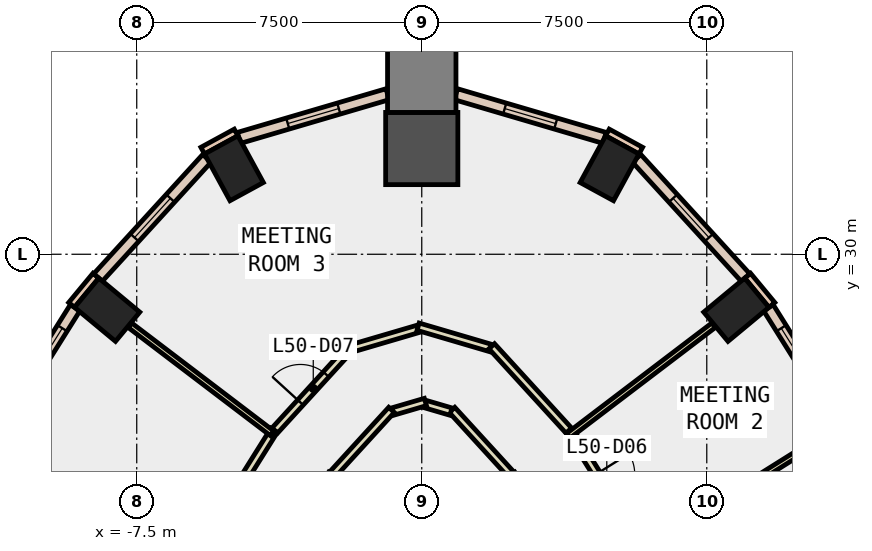
"""IFC4 building model, lengths in metres.
Left out: names, types, materials, properties, quantities, classifications, styles, units other than length and angle.
Written with IfcOpenShell. Run it as: python <this file> out.ifc"""

import sys

from ifc_helpers import new_model, si_unit, direction, frame, frame_2d, origin, origin_2d, place, context, subcontext, project, spatial, rectangle, extrude, element, fill, save


model = new_model("IFC4")
c1 = context("Model", 3, precision=1e-05, world=origin(), true_north=direction((0.0, 1.0)))
c2 = subcontext(c1, "Body", "Model", "MODEL_VIEW")
j1 = project(units=[si_unit("LENGTHUNIT", "METRE"), si_unit("PLANEANGLEUNIT", "RADIAN")], contexts=[c1])
p1 = place(None, origin())
s1 = spatial("IfcSite", under=j1, at=p1, CompositionType="ELEMENT")
p2 = place(p1, origin())
s2 = spatial("IfcBuilding", under=s1, at=p2, CompositionType="ELEMENT")
p3 = place(p2, frame((0.0, 0.0, 223.4)))
s3 = spatial("IfcBuildingStorey", under=s2, at=p3, CompositionType="ELEMENT", Elevation=223.4)
for number, where, z_axis, x_axis in (
    (1, (8.278, 28.54, -0.4), (0.0, 0.0, 1.0), (-0.639, 0.769, 0.0)),
    (2, (4.942, 32.263, -0.4), (0.0, 0.0, 1.0), (-0.878, 0.478, 0.0)),
):
    element("IfcColumn", number, at=place(p3, frame(where, z_axis=z_axis, x_axis=x_axis)), inside=s3, PredefinedType="COLUMN", context=c2, shape_type="SweptSolid", body=[
        extrude(rectangle(XDim=1.0, YDim=1.4, at=origin_2d()), origin(), (0.0, 0.0, 1.0), 4.2),
    ])
p4 = place(p3, frame((0.0, 32.782, -0.4), z_axis=(0.0, 0.0, 1.0), x_axis=(0.0, 1.0, 0.0)))
e3 = element("IfcColumn", 3, at=p4, inside=s3, PredefinedType="COLUMN", context=c2, shape_type="SweptSolid", body=[
    extrude(rectangle(XDim=1.9, YDim=1.9, at=origin_2d()), origin(), (0.0, 0.0, 1.0), 4.2),
])
for number, where, z_axis, x_axis in (
    (4, (-4.942, 32.263, -0.4), (0.0, 0.0, 1.0), (0.878, 0.478, 0.0)),
    (5, (-8.278, 28.54, -0.4), (0.0, 0.0, 1.0), (0.639, 0.769, 0.0)),
):
    element("IfcColumn", number, at=place(p3, frame(where, z_axis=z_axis, x_axis=x_axis)), inside=s3, PredefinedType="COLUMN", context=c2, shape_type="SweptSolid", body=[
        extrude(rectangle(XDim=1.0, YDim=1.4, at=origin_2d()), origin(), (0.0, 0.0, 1.0), 4.2),
    ])
p5 = place(p3, frame((0.0, 34.632, -0.4), z_axis=(0.0, 0.0, 1.0), x_axis=(0.0, 1.0, 0.0)))
e6 = element("IfcColumn", 6, at=p5, inside=s3, PredefinedType="COLUMN", context=c2, shape_type="SweptSolid", body=[
    extrude(rectangle(XDim=1.8, YDim=1.8, at=origin_2d()), origin(), (0.0, 0.0, 1.0), 4.2),
])
for number, where, z_axis, x_axis in (
    (7, (5.764, 32.726, 0.0), (0.0, 0.0, 1.0), (-0.878, 0.478, 0.0)),
    (8, (-4.886, 33.204, 0.0), (0.0, 0.0, 1.0), (-0.878, -0.478, 0.0)),
):
    element("IfcWall", number, at=place(p3, frame(where, z_axis=z_axis, x_axis=x_axis)), inside=s3, PredefinedType="STANDARD", context=c2, shape_type="SweptSolid", body=[
        extrude(rectangle(XDim=1.0, YDim=0.2, at=frame_2d((0.5, 0.0))), origin(), (0.0, 0.0, 1.0), 3.8),
    ])
for number, where, z_axis, x_axis in (
    (9, (9.213, 28.666, 0.0), (0.0, 0.0, 1.0), (-0.638, 0.77, 0.0)),
    (10, (-8.575, 29.436, 0.0), (0.0, 0.0, 1.0), (-0.638, -0.77, 0.0)),
):
    element("IfcWall", number, at=place(p3, frame(where, z_axis=z_axis, x_axis=x_axis)), inside=s3, PredefinedType="STANDARD", context=c2, shape_type="SweptSolid", body=[
        extrude(rectangle(XDim=1.0, YDim=0.2, at=frame_2d((0.5, 0.0))), origin(), (0.0, 0.0, 1.0), 3.8),
    ])
p6 = place(p3, frame((13.021, 22.374, 0.0), z_axis=(0.0, 0.0, 1.0), x_axis=(-0.531239262679, 0.847221839773, 0.0)))
e11 = element("IfcWall", 11, at=p6, inside=s3, PredefinedType="STANDARD", context=c2, shape_type="SweptSolid", body=[
    extrude(rectangle(XDim=7.339, YDim=0.3, at=frame_2d((3.67, 0.0))), origin(), (0.0, 0.0, 1.0), 3.8),
])
p7 = place(p6, frame((0.635, 0.0, 0.9)))
e12 = element("IfcOpeningElement", 12, at=p7, cuts=e11, PredefinedType="OPENING", context=c2, shape_type="SweptSolid", body=[
    extrude(rectangle(XDim=2.4, YDim=2.6, at=frame_2d((1.2, 1.3))), frame((0.0, 0.16, 0.0), z_axis=(0.0, -1.0, 0.0), x_axis=(1.0, 0.0, 0.0)), (0.0, 0.0, 1.0), 0.32),
])
p8 = place(p6, frame((4.304, 0.0, 0.9)))
e13 = element("IfcOpeningElement", 13, at=p8, cuts=e11, PredefinedType="OPENING", context=c2, shape_type="SweptSolid", body=[
    extrude(rectangle(XDim=2.4, YDim=2.6, at=frame_2d((1.2, 1.3))), frame((0.0, 0.16, 0.0), z_axis=(0.0, -1.0, 0.0), x_axis=(1.0, 0.0, 0.0)), (0.0, 0.0, 1.0), 0.32),
])
p9 = place(p3, frame((8.518, 29.388, 0.0), z_axis=(0.0, 0.0, 1.0), x_axis=(-0.674487390017, 0.738286367684, 0.0)))
e14 = element("IfcWall", 14, at=p9, inside=s3, PredefinedType="STANDARD", context=c2, shape_type="SweptSolid", body=[
    extrude(rectangle(XDim=4.248, YDim=0.3, at=frame_2d((2.124, 0.0))), origin(), (0.0, 0.0, 1.0), 3.8),
])
p10 = place(p9, frame((1.424, 0.0, 0.9)))
e15 = element("IfcOpeningElement", 15, at=p10, cuts=e14, PredefinedType="OPENING", context=c2, shape_type="SweptSolid", body=[
    extrude(rectangle(XDim=1.4, YDim=2.6, at=frame_2d((0.7, 1.3))), frame((0.0, 0.16, 0.0), z_axis=(0.0, -1.0, 0.0), x_axis=(1.0, 0.0, 0.0)), (0.0, 0.0, 1.0), 0.32),
])
p11 = place(p3, frame((4.81, 33.062, 0.0), z_axis=(0.0, 0.0, 1.0), x_axis=(-0.959458909918, 0.281848541203, 0.0)))
e16 = element("IfcWall", 16, at=p11, inside=s3, PredefinedType="STANDARD", context=c2, shape_type="SweptSolid", body=[
    extrude(rectangle(XDim=4.076, YDim=0.3, at=frame_2d((2.038, 0.0))), origin(), (0.0, 0.0, 1.0), 3.8),
])
p12 = place(p11, frame((1.338, 0.0, 0.9)))
e17 = element("IfcOpeningElement", 17, at=p12, cuts=e16, PredefinedType="OPENING", context=c2, shape_type="SweptSolid", body=[
    extrude(rectangle(XDim=1.4, YDim=2.6, at=frame_2d((0.7, 1.3))), frame((0.0, 0.16, 0.0), z_axis=(0.0, -1.0, 0.0), x_axis=(1.0, 0.0, 0.0)), (0.0, 0.0, 1.0), 0.32),
])
p13 = place(p3, frame((-0.899, 34.211, 0.0), z_axis=(0.0, 0.0, 1.0), x_axis=(-0.959458909918, -0.281848541203, 0.0)))
e18 = element("IfcWall", 18, at=p13, inside=s3, PredefinedType="STANDARD", context=c2, shape_type="SweptSolid", body=[
    extrude(rectangle(XDim=4.076, YDim=0.3, at=frame_2d((2.038, 0.0))), origin(), (0.0, 0.0, 1.0), 3.8),
])
p14 = place(p13, frame((1.338, 0.0, 0.9)))
e19 = element("IfcOpeningElement", 19, at=p14, cuts=e18, PredefinedType="OPENING", context=c2, shape_type="SweptSolid", body=[
    extrude(rectangle(XDim=1.4, YDim=2.6, at=frame_2d((0.7, 1.3))), frame((0.0, 0.16, 0.0), z_axis=(0.0, -1.0, 0.0), x_axis=(1.0, 0.0, 0.0)), (0.0, 0.0, 1.0), 0.32),
])
p15 = place(p3, frame((-5.653, 32.524, 0.0), z_axis=(0.0, 0.0, 1.0), x_axis=(-0.674487390017, -0.738286367684, 0.0)))
e20 = element("IfcWall", 20, at=p15, inside=s3, PredefinedType="STANDARD", context=c2, shape_type="SweptSolid", body=[
    extrude(rectangle(XDim=4.248, YDim=0.3, at=frame_2d((2.124, 0.0))), origin(), (0.0, 0.0, 1.0), 3.8),
])
p16 = place(p15, frame((1.424, 0.0, 0.9)))
e21 = element("IfcOpeningElement", 21, at=p16, cuts=e20, PredefinedType="OPENING", context=c2, shape_type="SweptSolid", body=[
    extrude(rectangle(XDim=1.4, YDim=2.6, at=frame_2d((0.7, 1.3))), frame((0.0, 0.16, 0.0), z_axis=(0.0, -1.0, 0.0), x_axis=(1.0, 0.0, 0.0)), (0.0, 0.0, 1.0), 0.32),
])
p17 = place(p3, frame((-9.122, 28.592, 0.0), z_axis=(0.0, 0.0, 1.0), x_axis=(-0.531239262679, -0.847221839773, 0.0)))
e22 = element("IfcWall", 22, at=p17, inside=s3, PredefinedType="STANDARD", context=c2, shape_type="SweptSolid", body=[
    extrude(rectangle(XDim=7.339, YDim=0.3, at=frame_2d((3.67, 0.0))), origin(), (0.0, 0.0, 1.0), 3.8),
])
p18 = place(p17, frame((0.635, 0.0, 0.9)))
e23 = element("IfcOpeningElement", 23, at=p18, cuts=e22, PredefinedType="OPENING", context=c2, shape_type="SweptSolid", body=[
    extrude(rectangle(XDim=2.4, YDim=2.6, at=frame_2d((1.2, 1.3))), frame((0.0, 0.16, 0.0), z_axis=(0.0, -1.0, 0.0), x_axis=(1.0, 0.0, 0.0)), (0.0, 0.0, 1.0), 0.32),
])
p19 = place(p17, frame((4.304, 0.0, 0.9)))
e24 = element("IfcOpeningElement", 24, at=p19, cuts=e22, PredefinedType="OPENING", context=c2, shape_type="SweptSolid", body=[
    extrude(rectangle(XDim=2.4, YDim=2.6, at=frame_2d((1.2, 1.3))), frame((0.0, 0.16, 0.0), z_axis=(0.0, -1.0, 0.0), x_axis=(1.0, 0.0, 0.0)), (0.0, 0.0, 1.0), 0.32),
])
p20 = place(p3, frame((2.35, 24.205, 0.0), z_axis=(0.0, 0.0, 1.0), x_axis=(-0.67475930229, 0.738037860799, 0.0)))
e25 = element("IfcWall", 25, at=p20, inside=s3, PredefinedType="PARTITIONING", context=c2, shape_type="SweptSolid", body=[
    extrude(rectangle(XDim=2.303, YDim=0.2, at=frame_2d((1.152, 0.0))), origin(), (0.0, 0.0, 1.0), 3.8),
])
p21 = place(p3, frame((0.768, 25.86, 0.0), z_axis=(0.0, 0.0, 1.0), x_axis=(-0.959714481723, 0.280977069476, 0.0)))
e26 = element("IfcWall", 26, at=p21, inside=s3, PredefinedType="PARTITIONING", context=c2, shape_type="SweptSolid", body=[
    extrude(rectangle(XDim=0.7, YDim=0.2, at=frame_2d((0.35, 0.0))), origin(), (0.0, 0.0, 1.0), 3.8),
])
p22 = place(p3, frame((0.096, 26.113, 0.0), z_axis=(0.0, 0.0, 1.0), x_axis=(-0.959723140705, -0.280947491882, 0.0)))
e27 = element("IfcWall", 27, at=p22, inside=s3, PredefinedType="PARTITIONING", context=c2, shape_type="SweptSolid", body=[
    extrude(rectangle(XDim=0.9, YDim=0.2, at=frame_2d((0.45, 0.0))), origin(), (0.0, 0.0, 1.0), 3.8),
])
p23 = place(p3, frame((-0.796, 25.905, 0.0), z_axis=(0.0, 0.0, 1.0), x_axis=(-0.67475930229, -0.738037860799, 0.0)))
e28 = element("IfcWall", 28, at=p23, inside=s3, PredefinedType="PARTITIONING", context=c2, shape_type="SweptSolid", body=[
    extrude(rectangle(XDim=2.303, YDim=0.2, at=frame_2d((1.152, 0.0))), origin(), (0.0, 0.0, 1.0), 3.8),
])
p24 = place(p3, frame((3.923, 25.307, 0.0), z_axis=(0.0, 0.0, 1.0), x_axis=(0.531150612982, -0.847277419934, 0.0)))
e29 = element("IfcWall", 29, at=p24, inside=s3, PredefinedType="PARTITIONING", context=c2, shape_type="SweptSolid", body=[
    extrude(rectangle(XDim=3.562, YDim=0.2, at=frame_2d((1.781, 0.0))), origin(), (0.0, 0.0, 1.0), 3.8),
])
p25 = place(p24, frame((1.281, 0.0, 0.0)))
e30 = element("IfcOpeningElement", 30, at=p25, cuts=e29, PredefinedType="OPENING", context=c2, shape_type="SweptSolid", body=[
    extrude(rectangle(XDim=1.0, YDim=2.1, at=frame_2d((0.5, 1.05))), frame((0.0, 0.11, 0.0), z_axis=(0.0, -1.0, 0.0), x_axis=(1.0, 0.0, 0.0)), (0.0, 0.0, 1.0), 0.22),
])
p26 = place(p3, frame((-3.869, 25.36, 0.0), z_axis=(0.0, 0.0, 1.0), x_axis=(0.674594755709, 0.738188265668, 0.0)))
e31 = element("IfcWall", 31, at=p26, inside=s3, PredefinedType="PARTITIONING", context=c2, shape_type="SweptSolid", body=[
    extrude(rectangle(XDim=3.006, YDim=0.2, at=frame_2d((1.503, 0.0))), origin(), (0.0, 0.0, 1.0), 3.8),
])
p27 = place(p26, frame((1.003, 0.0, 0.0)))
e32 = element("IfcOpeningElement", 32, at=p27, cuts=e31, PredefinedType="OPENING", context=c2, shape_type="SweptSolid", body=[
    extrude(rectangle(XDim=1.0, YDim=2.1, at=frame_2d((0.5, 1.05))), frame((0.0, 0.11, 0.0), z_axis=(0.0, -1.0, 0.0), x_axis=(1.0, 0.0, 0.0)), (0.0, 0.0, 1.0), 0.22),
])
p28 = place(p3, frame((-1.813, 27.533, 0.0), z_axis=(0.0, 0.0, 1.0), x_axis=(0.959495744111, 0.281723121227, 0.0)))
e33 = element("IfcWall", 33, at=p28, inside=s3, PredefinedType="PARTITIONING", context=c2, shape_type="SweptSolid", body=[
    extrude(rectangle(XDim=1.79, YDim=0.2, at=frame_2d((0.895, 0.0))), origin(), (0.0, 0.0, 1.0), 3.8),
])
p29 = place(p3, frame((-0.096, 28.094, 0.0), z_axis=(0.0, 0.0, 1.0), x_axis=(0.959422144877, -0.281973665293, 0.0)))
e34 = element("IfcWall", 34, at=p29, inside=s3, PredefinedType="PARTITIONING", context=c2, shape_type="SweptSolid", body=[
    extrude(rectangle(XDim=1.99, YDim=0.2, at=frame_2d((0.995, 0.0))), origin(), (0.0, 0.0, 1.0), 3.8),
])
p30 = place(p3, frame((1.841, 27.579, 0.0), z_axis=(0.0, 0.0, 1.0), x_axis=(0.674594755709, -0.738188265668, 0.0)))
e35 = element("IfcWall", 35, at=p30, inside=s3, PredefinedType="PARTITIONING", context=c2, shape_type="SweptSolid", body=[
    extrude(rectangle(XDim=3.006, YDim=0.2, at=frame_2d((1.503, 0.0))), origin(), (0.0, 0.0, 1.0), 3.8),
])
p31 = place(p3, frame((-8.086, 18.669, 0.0), z_axis=(0.0, 0.0, 1.0), x_axis=(0.531329962263, 0.847164961033, 0.0)))
e36 = element("IfcWall", 36, at=p31, inside=s3, PredefinedType="PARTITIONING", context=c2, shape_type="SweptSolid", body=[
    extrude(rectangle(XDim=7.91, YDim=0.2, at=frame_2d((3.955, 0.0))), origin(), (0.0, 0.0, 1.0), 3.8),
])
p32 = place(p31, frame((3.455, 0.0, 0.0)))
e37 = element("IfcOpeningElement", 37, at=p32, cuts=e36, PredefinedType="OPENING", context=c2, shape_type="SweptSolid", body=[
    extrude(rectangle(XDim=1.0, YDim=2.1, at=frame_2d((0.5, 1.05))), frame((0.0, 0.11, 0.0), z_axis=(0.0, -1.0, 0.0), x_axis=(1.0, 0.0, 0.0)), (0.0, 0.0, 1.0), 0.22),
])
p33 = place(p3, frame((5.77, 22.172, 0.0), z_axis=(0.0, 0.0, 1.0), x_axis=(0.847187879248, 0.531293419171, 0.0)))
e38 = element("IfcWall", 38, at=p33, inside=s3, PredefinedType="PARTITIONING", context=c2, shape_type="SweptSolid", body=[
    extrude(rectangle(XDim=6.1, YDim=0.15, at=frame_2d((3.05, 0.0))), origin(), (0.0, 0.0, 1.0), 3.8),
])
p34 = place(p3, frame((3.856, 25.225, 0.0), z_axis=(0.0, 0.0, 1.0), x_axis=(0.795987848728, 0.605312600792, 0.0)))
e39 = element("IfcWall", 39, at=p34, inside=s3, PredefinedType="PARTITIONING", context=c2, shape_type="SweptSolid", body=[
    extrude(rectangle(XDim=4.804, YDim=0.15, at=frame_2d((2.402, 0.0))), origin(), (0.0, 0.0, 1.0), 3.8),
])
p35 = place(p3, frame((-3.936, 25.286, 0.0), z_axis=(0.0, 0.0, 1.0), x_axis=(-0.795977117067, 0.605326712698, 0.0)))
e40 = element("IfcWall", 40, at=p35, inside=s3, PredefinedType="PARTITIONING", context=c2, shape_type="SweptSolid", body=[
    extrude(rectangle(XDim=4.704, YDim=0.15, at=frame_2d((2.352, 0.0))), origin(), (0.0, 0.0, 1.0), 3.8),
])
p36 = place(p8, origin())
e41 = element("IfcWindow", 41, at=p36, inside=s3, PartitioningType="SINGLE_PANEL", PredefinedType="WINDOW", context=c2, shape_type="SweptSolid", body=[
    extrude(rectangle(XDim=2.4, YDim=2.6, at=frame_2d((1.2, 1.3))), frame((0.0, 0.03, 0.0), z_axis=(0.0, -1.0, 0.0), x_axis=(1.0, 0.0, 0.0)), (0.0, 0.0, 1.0), 0.06),
])
fill(e13, e41)
p37 = place(p10, origin())
e42 = element("IfcWindow", 42, at=p37, inside=s3, PartitioningType="SINGLE_PANEL", PredefinedType="WINDOW", context=c2, shape_type="SweptSolid", body=[
    extrude(rectangle(XDim=1.4, YDim=2.6, at=frame_2d((0.7, 1.3))), frame((0.0, 0.03, 0.0), z_axis=(0.0, -1.0, 0.0), x_axis=(1.0, 0.0, 0.0)), (0.0, 0.0, 1.0), 0.06),
])
fill(e15, e42)
p38 = place(p12, origin())
e43 = element("IfcWindow", 43, at=p38, inside=s3, PartitioningType="SINGLE_PANEL", PredefinedType="WINDOW", context=c2, shape_type="SweptSolid", body=[
    extrude(rectangle(XDim=1.4, YDim=2.6, at=frame_2d((0.7, 1.3))), frame((0.0, 0.03, 0.0), z_axis=(0.0, -1.0, 0.0), x_axis=(1.0, 0.0, 0.0)), (0.0, 0.0, 1.0), 0.06),
])
fill(e17, e43)
p39 = place(p14, origin())
e44 = element("IfcWindow", 44, at=p39, inside=s3, PartitioningType="SINGLE_PANEL", PredefinedType="WINDOW", context=c2, shape_type="SweptSolid", body=[
    extrude(rectangle(XDim=1.4, YDim=2.6, at=frame_2d((0.7, 1.3))), frame((0.0, 0.03, 0.0), z_axis=(0.0, -1.0, 0.0), x_axis=(1.0, 0.0, 0.0)), (0.0, 0.0, 1.0), 0.06),
])
fill(e19, e44)
p40 = place(p16, origin())
e45 = element("IfcWindow", 45, at=p40, inside=s3, PartitioningType="SINGLE_PANEL", PredefinedType="WINDOW", context=c2, shape_type="SweptSolid", body=[
    extrude(rectangle(XDim=1.4, YDim=2.6, at=frame_2d((0.7, 1.3))), frame((0.0, 0.03, 0.0), z_axis=(0.0, -1.0, 0.0), x_axis=(1.0, 0.0, 0.0)), (0.0, 0.0, 1.0), 0.06),
])
fill(e21, e45)
p41 = place(p18, origin())
e46 = element("IfcWindow", 46, at=p41, inside=s3, PartitioningType="SINGLE_PANEL", PredefinedType="WINDOW", context=c2, shape_type="SweptSolid", body=[
    extrude(rectangle(XDim=2.4, YDim=2.6, at=frame_2d((1.2, 1.3))), frame((0.0, 0.03, 0.0), z_axis=(0.0, -1.0, 0.0), x_axis=(1.0, 0.0, 0.0)), (0.0, 0.0, 1.0), 0.06),
])
fill(e23, e46)
p42 = place(p27, origin())
e47 = element("IfcDoor", 47, at=p42, inside=s3, OperationType="SINGLE_SWING_LEFT", PredefinedType="DOOR", context=c2, shape_type="SweptSolid", body=[
    extrude(rectangle(XDim=1.0, YDim=2.1, at=frame_2d((0.5, 1.05))), frame((0.0, 0.025, 0.0), z_axis=(0.0, -1.0, 0.0), x_axis=(1.0, 0.0, 0.0)), (0.0, 0.0, 1.0), 0.05),
])
fill(e32, e47)
save(model, sys.argv[1])
